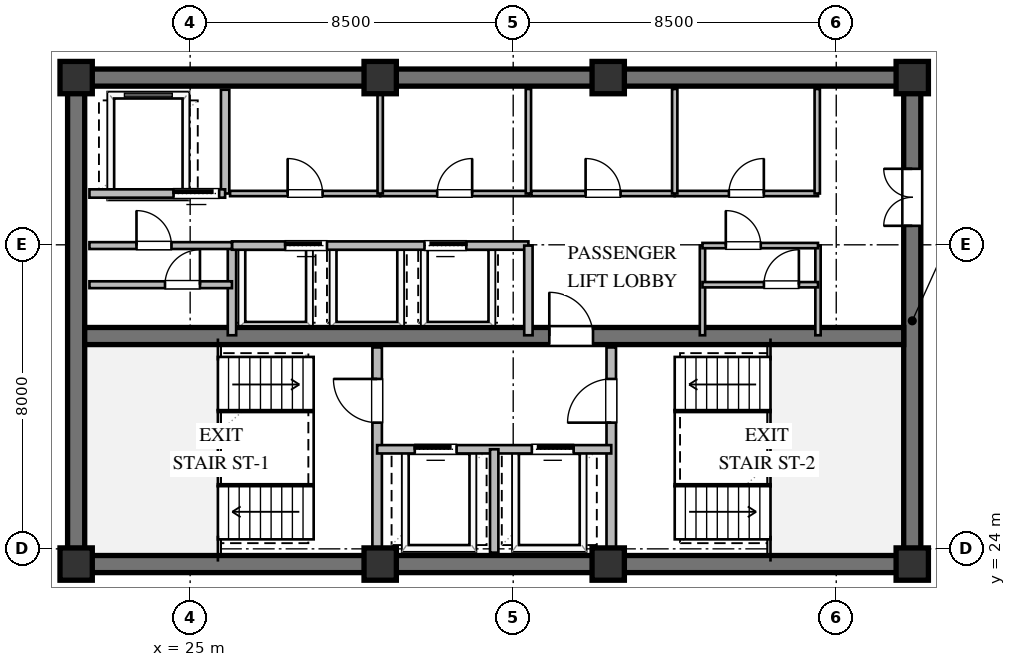
"""IFC4 building model, lengths in metres.
Left out: names, types, materials, properties, quantities, classifications, styles, units other than length and angle.
Written with IfcOpenShell. Run it as: python <this file> out.ifc"""

import sys

from ifc_helpers import new_model, si_unit, direction, frame, frame_2d, origin, origin_2d, place, context, subcontext, project, spatial, rectangle, extrude, element, fill, save


model = new_model("IFC4")
c1 = context("Model", 3, precision=1e-05, world=origin(), true_north=direction((0.0, 1.0)))
c2 = subcontext(c1, "Body", "Model", "MODEL_VIEW")
j1 = project(units=[si_unit("LENGTHUNIT", "METRE"), si_unit("PLANEANGLEUNIT", "RADIAN")], contexts=[c1])
p1 = place(None, origin())
s1 = spatial("IfcSite", under=j1, at=p1, CompositionType="ELEMENT")
p2 = place(p1, origin())
s2 = spatial("IfcBuilding", under=s1, at=p2, CompositionType="ELEMENT")
p3 = place(p2, frame((0.0, 0.0, 202.8)))
s3 = spatial("IfcBuildingStorey", under=s2, at=p3, CompositionType="ELEMENT", Elevation=202.8)
for number, where, z_axis, x_axis in (
    (1, (21.775, 23.6, 0.0), (0.0, 0.0, 1.0), (1.0, 0.0, 0.0)),
    (2, (21.775, 36.4, 0.0), (0.0, 0.0, 1.0), (1.0, 0.0, 0.0)),
):
    element("IfcWall", number, at=place(p3, frame(where, z_axis=z_axis, x_axis=x_axis)), inside=s3, PredefinedType="SHEAR", context=c2, shape_type="SweptSolid", body=[
        extrude(rectangle(XDim=22.45, YDim=0.45, at=frame_2d((11.225, 0.0))), origin(), (0.0, 0.0, 1.0), 3.36),
    ])
p4 = place(p3, frame((22.0, 23.825, 0.0), z_axis=(0.0, 0.0, 1.0), x_axis=(0.0, 1.0, 0.0)))
e3 = element("IfcWall", 3, at=p4, inside=s3, PredefinedType="SHEAR", context=c2, shape_type="SweptSolid", body=[
    extrude(rectangle(XDim=12.35, YDim=0.45, at=frame_2d((6.175, 0.0))), origin(), (0.0, 0.0, 1.0), 3.36),
])
p5 = place(p3, frame((44.0, 23.825, 0.0), z_axis=(0.0, 0.0, 1.0), x_axis=(0.0, 1.0, 0.0)))
e4 = element("IfcWall", 4, at=p5, inside=s3, PredefinedType="SHEAR", context=c2, shape_type="SweptSolid", body=[
    extrude(rectangle(XDim=12.35, YDim=0.45, at=frame_2d((6.175, 0.0))), origin(), (0.0, 0.0, 1.0), 3.36),
])
p6 = place(p5, frame((8.675, 0.0, 0.0)))
e5 = element("IfcOpeningElement", 5, at=p6, cuts=e4, PredefinedType="OPENING", context=c2, shape_type="SweptSolid", body=[
    extrude(rectangle(XDim=1.5, YDim=2.15, at=frame_2d((0.75, 1.075))), frame((0.0, 0.235, 0.0), z_axis=(0.0, -1.0, 0.0), x_axis=(1.0, 0.0, 0.0)), (0.0, 0.0, 1.0), 0.47),
])
p7 = place(p3, frame((22.225, 29.6, 0.0), z_axis=(0.0, 0.0, 1.0), x_axis=(1.0, 0.0, 0.0)))
e6 = element("IfcWall", 6, at=p7, inside=s3, PredefinedType="SHEAR", context=c2, shape_type="SweptSolid", body=[
    extrude(rectangle(XDim=21.55, YDim=0.45, at=frame_2d((10.775, 0.0))), origin(), (0.0, 0.0, 1.0), 3.36),
])
p8 = place(p7, frame((12.225, 0.0, 0.0)))
e7 = element("IfcOpeningElement", 7, at=p8, cuts=e6, PredefinedType="OPENING", context=c2, shape_type="SweptSolid", body=[
    extrude(rectangle(XDim=1.15, YDim=2.1, at=frame_2d((0.575, 1.05))), frame((0.0, 0.235, 0.0), z_axis=(0.0, -1.0, 0.0), x_axis=(1.0, 0.0, 0.0)), (0.0, 0.0, 1.0), 0.47),
])
for number, where, z_axis, x_axis in (
    (8, (22.0, 23.6, 0.0), (0.0, 0.0, 1.0), (1.0, 0.0, 0.0)),
    (9, (30.0, 23.6, 0.0), (0.0, 0.0, 1.0), (1.0, 0.0, 0.0)),
    (10, (36.0, 23.6, 0.0), (0.0, 0.0, 1.0), (1.0, 0.0, 0.0)),
    (11, (44.0, 23.6, 0.0), (0.0, 0.0, 1.0), (1.0, 0.0, 0.0)),
    (12, (44.0, 36.4, 0.0), (0.0, 0.0, 1.0), (1.0, 0.0, 0.0)),
    (13, (36.0, 36.4, 0.0), (0.0, 0.0, 1.0), (1.0, 0.0, 0.0)),
    (14, (30.0, 36.4, 0.0), (0.0, 0.0, 1.0), (1.0, 0.0, 0.0)),
    (15, (22.0, 36.4, 0.0), (0.0, 0.0, 1.0), (1.0, 0.0, 0.0)),
):
    element("IfcColumn", number, at=place(p3, frame(where, z_axis=z_axis, x_axis=x_axis)), inside=s3, PredefinedType="COLUMN", context=c2, shape_type="SweptSolid", body=[
        extrude(rectangle(XDim=0.85, YDim=0.85, at=origin_2d()), origin(), (0.0, 0.0, 1.0), 3.6),
    ])
p9 = place(p3, frame((29.92, 23.9, 0.0), z_axis=(0.0, 0.0, 1.0), x_axis=(0.0, 1.0, 0.0)))
e16 = element("IfcWall", 16, at=p9, inside=s3, PredefinedType="SOLIDWALL", context=c2, shape_type="SweptSolid", body=[
    extrude(rectangle(XDim=5.4, YDim=0.25, at=frame_2d((2.7, 0.0))), origin(), (0.0, 0.0, 1.0), 3.36),
])
p10 = place(p9, frame((3.421, 0.0, 0.0)))
e17 = element("IfcOpeningElement", 17, at=p10, cuts=e16, PredefinedType="OPENING", context=c2, shape_type="SweptSolid", body=[
    extrude(rectangle(XDim=1.15, YDim=2.1, at=frame_2d((0.575, 1.05))), frame((0.0, 0.135, 0.0), z_axis=(0.0, -1.0, 0.0), x_axis=(1.0, 0.0, 0.0)), (0.0, 0.0, 1.0), 0.27),
])
p11 = place(p3, frame((36.08, 23.9, 0.0), z_axis=(0.0, 0.0, 1.0), x_axis=(0.0, 1.0, 0.0)))
e18 = element("IfcWall", 18, at=p11, inside=s3, PredefinedType="SOLIDWALL", context=c2, shape_type="SweptSolid", body=[
    extrude(rectangle(XDim=5.4, YDim=0.25, at=frame_2d((2.7, 0.0))), origin(), (0.0, 0.0, 1.0), 3.36),
])
p12 = place(p11, frame((3.421, 0.0, 0.0)))
e19 = element("IfcOpeningElement", 19, at=p12, cuts=e18, PredefinedType="OPENING", context=c2, shape_type="SweptSolid", body=[
    extrude(rectangle(XDim=1.15, YDim=2.1, at=frame_2d((0.575, 1.05))), frame((0.0, 0.135, 0.0), z_axis=(0.0, -1.0, 0.0), x_axis=(1.0, 0.0, 0.0)), (0.0, 0.0, 1.0), 0.27),
])
p13 = place(p3, frame((29.92, 26.62, 0.0), z_axis=(0.0, 0.0, 1.0), x_axis=(1.0, 0.0, 0.0)))
e20 = element("IfcWall", 20, at=p13, inside=s3, PredefinedType="SOLIDWALL", context=c2, shape_type="SweptSolid", body=[
    extrude(rectangle(XDim=6.16, YDim=0.22, at=frame_2d((3.08, 0.0))), origin(), (0.0, 0.0, 1.0), 3.36),
])
p14 = place(p13, frame((0.99, 0.0, 0.0)))
e21 = element("IfcOpeningElement", 21, at=p14, cuts=e20, PredefinedType="OPENING", context=c2, shape_type="SweptSolid", body=[
    extrude(rectangle(XDim=1.1, YDim=2.1, at=frame_2d((0.55, 1.05))), frame((0.0, 0.12, 0.0), z_axis=(0.0, -1.0, 0.0), x_axis=(1.0, 0.0, 0.0)), (0.0, 0.0, 1.0), 0.24),
])
p15 = place(p13, frame((4.07, 0.0, 0.0)))
e22 = element("IfcOpeningElement", 22, at=p15, cuts=e20, PredefinedType="OPENING", context=c2, shape_type="SweptSolid", body=[
    extrude(rectangle(XDim=1.1, YDim=2.1, at=frame_2d((0.55, 1.05))), frame((0.0, 0.12, 0.0), z_axis=(0.0, -1.0, 0.0), x_axis=(1.0, 0.0, 0.0)), (0.0, 0.0, 1.0), 0.24),
])
p16 = place(p3, frame((33.0, 23.9, 0.0), z_axis=(0.0, 0.0, 1.0), x_axis=(0.0, 1.0, 0.0)))
e23 = element("IfcWall", 23, at=p16, inside=s3, PredefinedType="SOLIDWALL", context=c2, shape_type="SweptSolid", body=[
    extrude(rectangle(XDim=2.72, YDim=0.22, at=frame_2d((1.36, 0.0))), origin(), (0.0, 0.0, 1.0), 3.36),
])
p17 = place(p3, frame((25.92, 33.35, 0.0), z_axis=(0.0, 0.0, 1.0), x_axis=(0.0, 1.0, 0.0)))
e24 = element("IfcWall", 24, at=p17, inside=s3, PredefinedType="SOLIDWALL", context=c2, shape_type="SweptSolid", body=[
    extrude(rectangle(XDim=2.73, YDim=0.22, at=frame_2d((1.365, 0.0))), origin(), (0.0, 0.0, 1.0), 3.36),
])
p18 = place(p3, frame((22.35, 33.35, 0.0), z_axis=(0.0, 0.0, 1.0), x_axis=(1.0, 0.0, 0.0)))
e25 = element("IfcWall", 25, at=p18, inside=s3, PredefinedType="SOLIDWALL", context=c2, shape_type="SweptSolid", body=[
    extrude(rectangle(XDim=3.57, YDim=0.22, at=frame_2d((1.785, 0.0))), origin(), (0.0, 0.0, 1.0), 3.36),
])
p19 = place(p18, frame((2.213, 0.0, 0.0)))
e26 = element("IfcOpeningElement", 26, at=p19, cuts=e25, PredefinedType="OPENING", context=c2, shape_type="SweptSolid", body=[
    extrude(rectangle(XDim=1.2, YDim=2.1, at=frame_2d((0.6, 1.05))), frame((0.0, 0.12, 0.0), z_axis=(0.0, -1.0, 0.0), x_axis=(1.0, 0.0, 0.0)), (0.0, 0.0, 1.0), 0.24),
])
p20 = place(p3, frame((26.1, 29.62, 0.0), z_axis=(0.0, 0.0, 1.0), x_axis=(0.0, 1.0, 0.0)))
e27 = element("IfcWall", 27, at=p20, inside=s3, PredefinedType="SOLIDWALL", context=c2, shape_type="SweptSolid", body=[
    extrude(rectangle(XDim=2.36, YDim=0.22, at=frame_2d((1.18, 0.0))), origin(), (0.0, 0.0, 1.0), 3.36),
])
p21 = place(p3, frame((26.1, 31.98, 0.0), z_axis=(0.0, 0.0, 1.0), x_axis=(1.0, 0.0, 0.0)))
e28 = element("IfcWall", 28, at=p21, inside=s3, PredefinedType="SOLIDWALL", context=c2, shape_type="SweptSolid", body=[
    extrude(rectangle(XDim=7.8, YDim=0.22, at=frame_2d((3.9, 0.0))), origin(), (0.0, 0.0, 1.0), 3.36),
])
p22 = place(p21, frame((1.4, 0.0, 0.0)))
e29 = element("IfcOpeningElement", 29, at=p22, cuts=e28, PredefinedType="OPENING", context=c2, shape_type="SweptSolid", body=[
    extrude(rectangle(XDim=1.1, YDim=2.1, at=frame_2d((0.55, 1.05))), frame((0.0, 0.12, 0.0), z_axis=(0.0, -1.0, 0.0), x_axis=(1.0, 0.0, 0.0)), (0.0, 0.0, 1.0), 0.24),
])
p23 = place(p21, frame((5.066, 0.0, 0.0)))
e30 = element("IfcOpeningElement", 30, at=p23, cuts=e28, PredefinedType="OPENING", context=c2, shape_type="SweptSolid", body=[
    extrude(rectangle(XDim=1.1, YDim=2.1, at=frame_2d((0.55, 1.05))), frame((0.0, 0.12, 0.0), z_axis=(0.0, -1.0, 0.0), x_axis=(1.0, 0.0, 0.0)), (0.0, 0.0, 1.0), 0.24),
])
p24 = place(p3, frame((33.9, 29.62, 0.0), z_axis=(0.0, 0.0, 1.0), x_axis=(0.0, 1.0, 0.0)))
e31 = element("IfcWall", 31, at=p24, inside=s3, PredefinedType="SOLIDWALL", context=c2, shape_type="SweptSolid", body=[
    extrude(rectangle(XDim=2.36, YDim=0.22, at=frame_2d((1.18, 0.0))), origin(), (0.0, 0.0, 1.0), 3.36),
])
p25 = place(p3, frame((26.05, 33.35, 0.0), z_axis=(0.0, 0.0, 1.0), x_axis=(1.0, 0.0, 0.0)))
e32 = element("IfcWall", 32, at=p25, inside=s3, PredefinedType="PARTITIONING", context=c2, shape_type="SweptSolid", body=[
    extrude(rectangle(XDim=3.95, YDim=0.14, at=frame_2d((1.975, 0.0))), origin(), (0.0, 0.0, 1.0), 3.36),
])
p26 = place(p25, frame((1.515, 0.0, 0.0)))
e33 = element("IfcOpeningElement", 33, at=p26, cuts=e32, PredefinedType="OPENING", context=c2, shape_type="SweptSolid", body=[
    extrude(rectangle(XDim=0.92, YDim=2.1, at=frame_2d((0.46, 1.05))), frame((0.0, 0.08, 0.0), z_axis=(0.0, -1.0, 0.0), x_axis=(1.0, 0.0, 0.0)), (0.0, 0.0, 1.0), 0.16),
])
p27 = place(p3, frame((30.0, 33.35, 0.0), z_axis=(0.0, 0.0, 1.0), x_axis=(1.0, 0.0, 0.0)))
e34 = element("IfcWall", 34, at=p27, inside=s3, PredefinedType="PARTITIONING", context=c2, shape_type="SweptSolid", body=[
    extrude(rectangle(XDim=3.92, YDim=0.14, at=frame_2d((1.96, 0.0))), origin(), (0.0, 0.0, 1.0), 3.36),
])
p28 = place(p27, frame((1.5, 0.0, 0.0)))
e35 = element("IfcOpeningElement", 35, at=p28, cuts=e34, PredefinedType="OPENING", context=c2, shape_type="SweptSolid", body=[
    extrude(rectangle(XDim=0.92, YDim=2.1, at=frame_2d((0.46, 1.05))), frame((0.0, 0.08, 0.0), z_axis=(0.0, -1.0, 0.0), x_axis=(1.0, 0.0, 0.0)), (0.0, 0.0, 1.0), 0.16),
])
for number, where, z_axis, x_axis in (
    (36, (30.0, 33.35, 0.0), (0.0, 0.0, 1.0), (0.0, 1.0, 0.0)),
    (37, (33.9, 33.35, 0.0), (0.0, 0.0, 1.0), (0.0, 1.0, 0.0)),
):
    element("IfcWall", number, at=place(p3, frame(where, z_axis=z_axis, x_axis=x_axis)), inside=s3, PredefinedType="PARTITIONING", context=c2, shape_type="SweptSolid", body=[
        extrude(rectangle(XDim=2.75, YDim=0.14, at=frame_2d((1.375, 0.0))), origin(), (0.0, 0.0, 1.0), 3.36),
    ])
p29 = place(p3, frame((33.98, 33.35, 0.0), z_axis=(0.0, 0.0, 1.0), x_axis=(1.0, 0.0, 0.0)))
e38 = element("IfcWall", 38, at=p29, inside=s3, PredefinedType="PARTITIONING", context=c2, shape_type="SweptSolid", body=[
    extrude(rectangle(XDim=3.77, YDim=0.14, at=frame_2d((1.885, 0.0))), origin(), (0.0, 0.0, 1.0), 3.36),
])
p30 = place(p29, frame((1.425, 0.0, 0.0)))
e39 = element("IfcOpeningElement", 39, at=p30, cuts=e38, PredefinedType="OPENING", context=c2, shape_type="SweptSolid", body=[
    extrude(rectangle(XDim=0.92, YDim=2.1, at=frame_2d((0.46, 1.05))), frame((0.0, 0.08, 0.0), z_axis=(0.0, -1.0, 0.0), x_axis=(1.0, 0.0, 0.0)), (0.0, 0.0, 1.0), 0.16),
])
p31 = place(p3, frame((37.75, 33.35, 0.0), z_axis=(0.0, 0.0, 1.0), x_axis=(1.0, 0.0, 0.0)))
e40 = element("IfcWall", 40, at=p31, inside=s3, PredefinedType="PARTITIONING", context=c2, shape_type="SweptSolid", body=[
    extrude(rectangle(XDim=3.77, YDim=0.14, at=frame_2d((1.885, 0.0))), origin(), (0.0, 0.0, 1.0), 3.36),
])
p32 = place(p31, frame((1.425, 0.0, 0.0)))
e41 = element("IfcOpeningElement", 41, at=p32, cuts=e40, PredefinedType="OPENING", context=c2, shape_type="SweptSolid", body=[
    extrude(rectangle(XDim=0.92, YDim=2.1, at=frame_2d((0.46, 1.05))), frame((0.0, 0.08, 0.0), z_axis=(0.0, -1.0, 0.0), x_axis=(1.0, 0.0, 0.0)), (0.0, 0.0, 1.0), 0.16),
])
for number, where, z_axis, x_axis in (
    (42, (37.75, 33.35, 0.0), (0.0, 0.0, 1.0), (0.0, 1.0, 0.0)),
    (43, (41.5, 33.35, 0.0), (0.0, 0.0, 1.0), (0.0, 1.0, 0.0)),
):
    element("IfcWall", number, at=place(p3, frame(where, z_axis=z_axis, x_axis=x_axis)), inside=s3, PredefinedType="PARTITIONING", context=c2, shape_type="SweptSolid", body=[
        extrude(rectangle(XDim=2.75, YDim=0.14, at=frame_2d((1.375, 0.0))), origin(), (0.0, 0.0, 1.0), 3.36),
    ])
p33 = place(p3, frame((22.35, 30.95, 0.0), z_axis=(0.0, 0.0, 1.0), x_axis=(1.0, 0.0, 0.0)))
e44 = element("IfcWall", 44, at=p33, inside=s3, PredefinedType="PARTITIONING", context=c2, shape_type="SweptSolid", body=[
    extrude(rectangle(XDim=3.75, YDim=0.18, at=frame_2d((1.875, 0.0))), origin(), (0.0, 0.0, 1.0), 3.36),
])
p34 = place(p33, frame((1.988, 0.0, 0.0)))
e45 = element("IfcOpeningElement", 45, at=p34, cuts=e44, PredefinedType="OPENING", context=c2, shape_type="SweptSolid", body=[
    extrude(rectangle(XDim=0.92, YDim=2.1, at=frame_2d((0.46, 1.05))), frame((0.0, 0.1, 0.0), z_axis=(0.0, -1.0, 0.0), x_axis=(1.0, 0.0, 0.0)), (0.0, 0.0, 1.0), 0.2),
])
p35 = place(p3, frame((22.35, 31.98, 0.0), z_axis=(0.0, 0.0, 1.0), x_axis=(1.0, 0.0, 0.0)))
e46 = element("IfcWall", 46, at=p35, inside=s3, PredefinedType="PARTITIONING", context=c2, shape_type="SweptSolid", body=[
    extrude(rectangle(XDim=3.75, YDim=0.18, at=frame_2d((1.875, 0.0))), origin(), (0.0, 0.0, 1.0), 3.36),
])
p36 = place(p35, frame((1.238, 0.0, 0.0)))
e47 = element("IfcOpeningElement", 47, at=p36, cuts=e46, PredefinedType="OPENING", context=c2, shape_type="SweptSolid", body=[
    extrude(rectangle(XDim=0.92, YDim=2.1, at=frame_2d((0.46, 1.05))), frame((0.0, 0.1, 0.0), z_axis=(0.0, -1.0, 0.0), x_axis=(1.0, 0.0, 0.0)), (0.0, 0.0, 1.0), 0.2),
])
for number, where, z_axis, x_axis in (
    (48, (38.48, 29.62, 0.0), (0.0, 0.0, 1.0), (0.0, 1.0, 0.0)),
    (49, (41.52, 29.62, 0.0), (0.0, 0.0, 1.0), (0.0, 1.0, 0.0)),
):
    element("IfcWall", number, at=place(p3, frame(where, z_axis=z_axis, x_axis=x_axis)), inside=s3, PredefinedType="PARTITIONING", context=c2, shape_type="SweptSolid", body=[
        extrude(rectangle(XDim=2.36, YDim=0.14, at=frame_2d((1.18, 0.0))), origin(), (0.0, 0.0, 1.0), 3.36),
    ])
p37 = place(p3, frame((38.48, 30.95, 0.0), z_axis=(0.0, 0.0, 1.0), x_axis=(1.0, 0.0, 0.0)))
e50 = element("IfcWall", 50, at=p37, inside=s3, PredefinedType="PARTITIONING", context=c2, shape_type="SweptSolid", body=[
    extrude(rectangle(XDim=3.04, YDim=0.14, at=frame_2d((1.52, 0.0))), origin(), (0.0, 0.0, 1.0), 3.36),
])
p38 = place(p37, frame((1.617, 0.0, 0.0)))
e51 = element("IfcOpeningElement", 51, at=p38, cuts=e50, PredefinedType="OPENING", context=c2, shape_type="SweptSolid", body=[
    extrude(rectangle(XDim=0.92, YDim=2.1, at=frame_2d((0.46, 1.05))), frame((0.0, 0.08, 0.0), z_axis=(0.0, -1.0, 0.0), x_axis=(1.0, 0.0, 0.0)), (0.0, 0.0, 1.0), 0.16),
])
p39 = place(p3, frame((38.48, 31.98, 0.0), z_axis=(0.0, 0.0, 1.0), x_axis=(1.0, 0.0, 0.0)))
e52 = element("IfcWall", 52, at=p39, inside=s3, PredefinedType="PARTITIONING", context=c2, shape_type="SweptSolid", body=[
    extrude(rectangle(XDim=3.04, YDim=0.14, at=frame_2d((1.52, 0.0))), origin(), (0.0, 0.0, 1.0), 3.36),
])
p40 = place(p39, frame((0.614, 0.0, 0.0)))
e53 = element("IfcOpeningElement", 53, at=p40, cuts=e52, PredefinedType="OPENING", context=c2, shape_type="SweptSolid", body=[
    extrude(rectangle(XDim=0.92, YDim=2.1, at=frame_2d((0.46, 1.05))), frame((0.0, 0.08, 0.0), z_axis=(0.0, -1.0, 0.0), x_axis=(1.0, 0.0, 0.0)), (0.0, 0.0, 1.0), 0.16),
])
p41 = place(p10, origin())
e54 = element("IfcDoor", 54, at=p41, inside=s3, OperationType="SINGLE_SWING_RIGHT", PredefinedType="DOOR", context=c2, shape_type="SweptSolid", body=[
    extrude(rectangle(XDim=1.15, YDim=2.1, at=frame_2d((0.575, 1.05))), frame((0.0, 0.025, 0.0), z_axis=(0.0, -1.0, 0.0), x_axis=(1.0, 0.0, 0.0)), (0.0, 0.0, 1.0), 0.05),
])
fill(e17, e54)
p42 = place(p12, origin())
e55 = element("IfcDoor", 55, at=p42, inside=s3, OperationType="SINGLE_SWING_LEFT", PredefinedType="DOOR", context=c2, shape_type="SweptSolid", body=[
    extrude(rectangle(XDim=1.15, YDim=2.1, at=frame_2d((0.575, 1.05))), frame((0.0, 0.025, 0.0), z_axis=(0.0, -1.0, 0.0), x_axis=(1.0, 0.0, 0.0)), (0.0, 0.0, 1.0), 0.05),
])
fill(e19, e55)
p43 = place(p14, origin())
e56 = element("IfcDoor", 56, at=p43, inside=s3, OperationType="SLIDING_TO_LEFT", PredefinedType="DOOR", context=c2, shape_type="SweptSolid", body=[
    extrude(rectangle(XDim=1.1, YDim=2.1, at=frame_2d((0.55, 1.05))), frame((0.0, 0.025, 0.0), z_axis=(0.0, -1.0, 0.0), x_axis=(1.0, 0.0, 0.0)), (0.0, 0.0, 1.0), 0.05),
])
fill(e21, e56)
p44 = place(p15, origin())
e57 = element("IfcDoor", 57, at=p44, inside=s3, OperationType="SLIDING_TO_RIGHT", PredefinedType="DOOR", context=c2, shape_type="SweptSolid", body=[
    extrude(rectangle(XDim=1.1, YDim=2.1, at=frame_2d((0.55, 1.05))), frame((0.0, 0.025, 0.0), z_axis=(0.0, -1.0, 0.0), x_axis=(1.0, 0.0, 0.0)), (0.0, 0.0, 1.0), 0.05),
])
fill(e22, e57)
p45 = place(p8, origin())
e58 = element("IfcDoor", 58, at=p45, inside=s3, OperationType="SINGLE_SWING_LEFT", PredefinedType="DOOR", context=c2, shape_type="SweptSolid", body=[
    extrude(rectangle(XDim=1.15, YDim=2.1, at=frame_2d((0.575, 1.05))), frame((0.0, 0.025, 0.0), z_axis=(0.0, -1.0, 0.0), x_axis=(1.0, 0.0, 0.0)), (0.0, 0.0, 1.0), 0.05),
])
fill(e7, e58)
p46 = place(p6, origin())
e59 = element("IfcDoor", 59, at=p46, inside=s3, OperationType="DOUBLE_DOOR_SINGLE_SWING", PredefinedType="DOOR", context=c2, shape_type="SweptSolid", body=[
    extrude(rectangle(XDim=1.5, YDim=2.15, at=frame_2d((0.75, 1.075))), frame((0.0, 0.025, 0.0), z_axis=(0.0, -1.0, 0.0), x_axis=(1.0, 0.0, 0.0)), (0.0, 0.0, 1.0), 0.05),
])
fill(e5, e59)
p47 = place(p19, origin())
e60 = element("IfcDoor", 60, at=p47, inside=s3, OperationType="SLIDING_TO_LEFT", PredefinedType="DOOR", context=c2, shape_type="SweptSolid", body=[
    extrude(rectangle(XDim=1.2, YDim=2.1, at=frame_2d((0.6, 1.05))), frame((0.0, 0.025, 0.0), z_axis=(0.0, -1.0, 0.0), x_axis=(1.0, 0.0, 0.0)), (0.0, 0.0, 1.0), 0.05),
])
fill(e26, e60)
p48 = place(p22, origin())
e61 = element("IfcDoor", 61, at=p48, inside=s3, OperationType="SLIDING_TO_LEFT", PredefinedType="DOOR", context=c2, shape_type="SweptSolid", body=[
    extrude(rectangle(XDim=1.1, YDim=2.1, at=frame_2d((0.55, 1.05))), frame((0.0, 0.025, 0.0), z_axis=(0.0, -1.0, 0.0), x_axis=(1.0, 0.0, 0.0)), (0.0, 0.0, 1.0), 0.05),
])
fill(e29, e61)
p49 = place(p23, origin())
e62 = element("IfcDoor", 62, at=p49, inside=s3, OperationType="SLIDING_TO_RIGHT", PredefinedType="DOOR", context=c2, shape_type="SweptSolid", body=[
    extrude(rectangle(XDim=1.1, YDim=2.1, at=frame_2d((0.55, 1.05))), frame((0.0, 0.025, 0.0), z_axis=(0.0, -1.0, 0.0), x_axis=(1.0, 0.0, 0.0)), (0.0, 0.0, 1.0), 0.05),
])
fill(e30, e62)
p50 = place(p26, origin())
e63 = element("IfcDoor", 63, at=p50, inside=s3, OperationType="SINGLE_SWING_LEFT", PredefinedType="DOOR", context=c2, shape_type="SweptSolid", body=[
    extrude(rectangle(XDim=0.92, YDim=2.1, at=frame_2d((0.46, 1.05))), frame((0.0, 0.025, 0.0), z_axis=(0.0, -1.0, 0.0), x_axis=(1.0, 0.0, 0.0)), (0.0, 0.0, 1.0), 0.05),
])
fill(e33, e63)
p51 = place(p28, origin())
e64 = element("IfcDoor", 64, at=p51, inside=s3, OperationType="SINGLE_SWING_RIGHT", PredefinedType="DOOR", context=c2, shape_type="SweptSolid", body=[
    extrude(rectangle(XDim=0.92, YDim=2.1, at=frame_2d((0.46, 1.05))), frame((0.0, 0.025, 0.0), z_axis=(0.0, -1.0, 0.0), x_axis=(1.0, 0.0, 0.0)), (0.0, 0.0, 1.0), 0.05),
])
fill(e35, e64)
p52 = place(p30, origin())
e65 = element("IfcDoor", 65, at=p52, inside=s3, OperationType="SINGLE_SWING_LEFT", PredefinedType="DOOR", context=c2, shape_type="SweptSolid", body=[
    extrude(rectangle(XDim=0.92, YDim=2.1, at=frame_2d((0.46, 1.05))), frame((0.0, 0.025, 0.0), z_axis=(0.0, -1.0, 0.0), x_axis=(1.0, 0.0, 0.0)), (0.0, 0.0, 1.0), 0.05),
])
fill(e39, e65)
p53 = place(p32, origin())
e66 = element("IfcDoor", 66, at=p53, inside=s3, OperationType="SINGLE_SWING_RIGHT", PredefinedType="DOOR", context=c2, shape_type="SweptSolid", body=[
    extrude(rectangle(XDim=0.92, YDim=2.1, at=frame_2d((0.46, 1.05))), frame((0.0, 0.025, 0.0), z_axis=(0.0, -1.0, 0.0), x_axis=(1.0, 0.0, 0.0)), (0.0, 0.0, 1.0), 0.05),
])
fill(e41, e66)
p54 = place(p36, origin())
e67 = element("IfcDoor", 67, at=p54, inside=s3, OperationType="SINGLE_SWING_LEFT", PredefinedType="DOOR", context=c2, shape_type="SweptSolid", body=[
    extrude(rectangle(XDim=0.92, YDim=2.1, at=frame_2d((0.46, 1.05))), frame((0.0, 0.025, 0.0), z_axis=(0.0, -1.0, 0.0), x_axis=(1.0, 0.0, 0.0)), (0.0, 0.0, 1.0), 0.05),
])
fill(e47, e67)
p55 = place(p34, origin())
e68 = element("IfcDoor", 68, at=p55, inside=s3, OperationType="SINGLE_SWING_RIGHT", PredefinedType="DOOR", context=c2, shape_type="SweptSolid", body=[
    extrude(rectangle(XDim=0.92, YDim=2.1, at=frame_2d((0.46, 1.05))), frame((0.0, 0.025, 0.0), z_axis=(0.0, -1.0, 0.0), x_axis=(1.0, 0.0, 0.0)), (0.0, 0.0, 1.0), 0.05),
])
fill(e45, e68)
p56 = place(p40, origin())
e69 = element("IfcDoor", 69, at=p56, inside=s3, OperationType="SINGLE_SWING_LEFT", PredefinedType="DOOR", context=c2, shape_type="SweptSolid", body=[
    extrude(rectangle(XDim=0.92, YDim=2.1, at=frame_2d((0.46, 1.05))), frame((0.0, 0.025, 0.0), z_axis=(0.0, -1.0, 0.0), x_axis=(1.0, 0.0, 0.0)), (0.0, 0.0, 1.0), 0.05),
])
fill(e53, e69)
p57 = place(p38, origin())
e70 = element("IfcDoor", 70, at=p57, inside=s3, OperationType="SINGLE_SWING_RIGHT", PredefinedType="DOOR", context=c2, shape_type="SweptSolid", body=[
    extrude(rectangle(XDim=0.92, YDim=2.1, at=frame_2d((0.46, 1.05))), frame((0.0, 0.025, 0.0), z_axis=(0.0, -1.0, 0.0), x_axis=(1.0, 0.0, 0.0)), (0.0, 0.0, 1.0), 0.05),
])
fill(e51, e70)
save(model, sys.argv[1])
